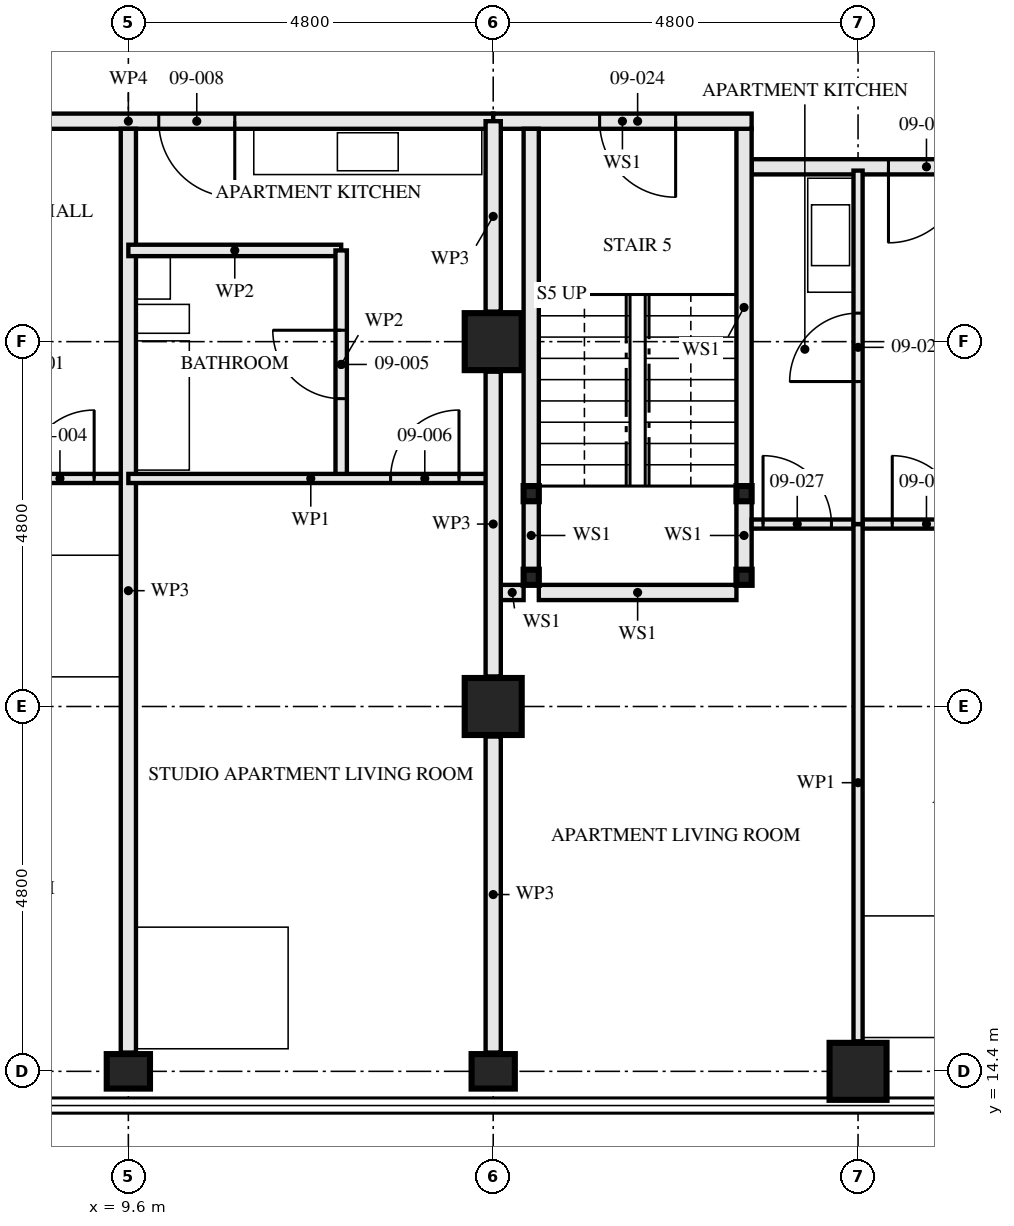
"""IFC4 building model, lengths in metres.
Left out: names, types, materials, properties, quantities, classifications, styles, units other than length and angle.
Written with IfcOpenShell. Run it as: python <this file> out.ifc"""

import sys

from ifc_helpers import new_model, si_unit, direction, frame, frame_2d, origin, origin_2d, place, context, subcontext, project, spatial, rectangle, hollow_rectangle, i_section, extrude, element, fill, save


model = new_model("IFC4")
c1 = context("Model", 3, precision=1e-05, world=origin(), true_north=direction((0.0, 1.0)))
c2 = subcontext(c1, "Body", "Model", "MODEL_VIEW")
j1 = project(units=[si_unit("LENGTHUNIT", "METRE"), si_unit("PLANEANGLEUNIT", "RADIAN")], contexts=[c1])
p1 = place(None, origin())
s1 = spatial("IfcSite", under=j1, at=p1, CompositionType="ELEMENT")
p2 = place(p1, origin())
s2 = spatial("IfcBuilding", under=s1, at=p2, CompositionType="ELEMENT")
p3 = place(p2, frame((0.0, 0.0, 37.5)))
s3 = spatial("IfcBuildingStorey", under=s2, at=p3, CompositionType="ELEMENT", Elevation=37.5)
for number, where, z_axis, x_axis in (
    (1, (9.6, 14.4, 0.0), (0.0, 0.0, 1.0), (0.0, 1.0, 0.0)),
    (2, (14.4, 14.4, 0.0), (0.0, 0.0, 1.0), (0.0, 1.0, 0.0)),
):
    element("IfcColumn", number, at=place(p3, frame(where, z_axis=z_axis, x_axis=x_axis)), inside=s3, PredefinedType="COLUMN", context=c2, shape_type="SweptSolid", body=[
        extrude(i_section(OverallWidth=0.454, OverallDepth=0.569, WebThickness=0.078, FlangeThickness=0.125, FilletRadius=0.015, at=origin_2d()), origin(), (0.0, 0.0, 1.0), 3.5),
    ])
for number, where, z_axis, x_axis in (
    (3, (14.4, 19.2, 0.0), (0.0, 0.0, 1.0), (1.0, 0.0, 0.0)),
    (4, (14.4, 24.0, 0.0), (0.0, 0.0, 1.0), (1.0, 0.0, 0.0)),
    (5, (19.2, 14.4, 0.0), (0.0, 0.0, 1.0), (0.0, 1.0, 0.0)),
):
    element("IfcColumn", number, at=place(p3, frame(where, z_axis=z_axis, x_axis=x_axis)), inside=s3, PredefinedType="COLUMN", context=c2, shape_type="SweptSolid", body=[
        extrude(hollow_rectangle(XDim=0.75, YDim=0.75, WallThickness=0.08, at=origin_2d()), origin(), (0.0, 0.0, 1.0), 3.5),
    ])
for number, where, z_axis, x_axis in (
    (6, (14.9, 20.9, 0.0), (0.0, 0.0, 1.0), (1.0, 0.0, 0.0)),
    (7, (17.7, 20.9, 0.0), (0.0, 0.0, 1.0), (1.0, 0.0, 0.0)),
    (8, (14.9, 22.0, 0.0), (0.0, 0.0, 1.0), (1.0, 0.0, 0.0)),
    (9, (17.7, 22.0, 0.0), (0.0, 0.0, 1.0), (1.0, 0.0, 0.0)),
):
    element("IfcColumn", number, at=place(p3, frame(where, z_axis=z_axis, x_axis=x_axis)), inside=s3, PredefinedType="COLUMN", context=c2, shape_type="SweptSolid", body=[
        extrude(hollow_rectangle(XDim=0.2, YDim=0.2, WallThickness=0.008, at=origin_2d()), origin(), (0.0, 0.0, 1.0), 3.33),
    ])
p4 = place(p3, frame((4.8, 22.2, 0.0), z_axis=(0.0, 0.0, 1.0), x_axis=(1.0, 0.0, 0.0)))
e10 = element("IfcWall", 10, at=p4, inside=s3, PredefinedType="PARTITIONING", context=c2, shape_type="SweptSolid", body=[
    extrude(rectangle(XDim=4.8, YDim=0.12, at=frame_2d((2.4, 0.0))), origin(), (0.0, 0.0, 1.0), 3.33),
])
p5 = place(p4, frame((3.45, 0.0, 0.0)))
e11 = element("IfcOpeningElement", 11, at=p5, cuts=e10, PredefinedType="OPENING", context=c2, shape_type="SweptSolid", body=[
    extrude(rectangle(XDim=0.9, YDim=2.1, at=frame_2d((0.45, 1.05))), frame((0.0, 0.071, 0.0), z_axis=(0.0, -1.0, 0.0), x_axis=(1.0, 0.0, 0.0)), (0.0, 0.0, 1.0), 0.141),
])
p6 = place(p3, frame((9.6, 14.647, 0.0), z_axis=(0.0, 0.0, 1.0), x_axis=(0.0, 1.0, 0.0)))
e12 = element("IfcWall", 12, at=p6, inside=s3, PredefinedType="PARTITIONING", context=c2, shape_type="SweptSolid", body=[
    extrude(rectangle(XDim=12.153, YDim=0.2, at=frame_2d((6.077, 0.0))), origin(), (0.0, 0.0, 1.0), 2.55),
])
p7 = place(p3, frame((12.4, 22.2, 0.0), z_axis=(0.0, 0.0, 1.0), x_axis=(0.0, 1.0, 0.0)))
e13 = element("IfcWall", 13, at=p7, inside=s3, PredefinedType="PARTITIONING", context=c2, shape_type="SweptSolid", body=[
    extrude(rectangle(XDim=3.0, YDim=0.15, at=frame_2d((1.5, 0.0))), origin(), (0.0, 0.0, 1.0), 2.55),
])
p8 = place(p7, frame((1.05, 0.0, 0.0)))
e14 = element("IfcOpeningElement", 14, at=p8, cuts=e13, PredefinedType="OPENING", context=c2, shape_type="SweptSolid", body=[
    extrude(rectangle(XDim=0.9, YDim=2.1, at=frame_2d((0.45, 1.05))), frame((0.0, 0.085, 0.0), z_axis=(0.0, -1.0, 0.0), x_axis=(1.0, 0.0, 0.0)), (0.0, 0.0, 1.0), 0.171),
])
p9 = place(p3, frame((9.6, 25.2, 0.0), z_axis=(0.0, 0.0, 1.0), x_axis=(1.0, 0.0, 0.0)))
e15 = element("IfcWall", 15, at=p9, inside=s3, PredefinedType="PARTITIONING", context=c2, shape_type="SweptSolid", body=[
    extrude(rectangle(XDim=2.8, YDim=0.15, at=frame_2d((1.4, 0.0))), origin(), (0.0, 0.0, 1.0), 3.33),
])
p10 = place(p3, frame((9.6, 22.2, 0.0), z_axis=(0.0, 0.0, 1.0), x_axis=(1.0, 0.0, 0.0)))
e16 = element("IfcWall", 16, at=p10, inside=s3, PredefinedType="PARTITIONING", context=c2, shape_type="SweptSolid", body=[
    extrude(rectangle(XDim=4.8, YDim=0.12, at=frame_2d((2.4, 0.0))), origin(), (0.0, 0.0, 1.0), 3.33),
])
p11 = place(p10, frame((3.45, 0.0, 0.0)))
e17 = element("IfcOpeningElement", 17, at=p11, cuts=e16, PredefinedType="OPENING", context=c2, shape_type="SweptSolid", body=[
    extrude(rectangle(XDim=0.9, YDim=2.1, at=frame_2d((0.45, 1.05))), frame((0.0, 0.071, 0.0), z_axis=(0.0, -1.0, 0.0), x_axis=(1.0, 0.0, 0.0)), (0.0, 0.0, 1.0), 0.141),
])
p12 = place(p3, frame((4.8, 26.9, 0.0), z_axis=(0.0, 0.0, 1.0), x_axis=(1.0, 0.0, 0.0)))
e18 = element("IfcWall", 18, at=p12, inside=s3, PredefinedType="PARTITIONING", context=c2, shape_type="SweptSolid", body=[
    extrude(rectangle(XDim=9.6, YDim=0.2, at=frame_2d((4.8, 0.0))), origin(), (0.0, 0.0, 1.0), 3.33),
])
p13 = place(p12, frame((0.4, 0.0, 0.0)))
e19 = element("IfcOpeningElement", 19, at=p13, cuts=e18, PredefinedType="OPENING", context=c2, shape_type="SweptSolid", body=[
    extrude(rectangle(XDim=1.0, YDim=2.1, at=frame_2d((0.5, 1.05))), frame((0.0, 0.111, 0.0), z_axis=(0.0, -1.0, 0.0), x_axis=(1.0, 0.0, 0.0)), (0.0, 0.0, 1.0), 0.221),
])
p14 = place(p12, frame((5.2, 0.0, 0.0)))
e20 = element("IfcOpeningElement", 20, at=p14, cuts=e18, PredefinedType="OPENING", context=c2, shape_type="SweptSolid", body=[
    extrude(rectangle(XDim=1.0, YDim=2.1, at=frame_2d((0.5, 1.05))), frame((0.0, 0.111, 0.0), z_axis=(0.0, -1.0, 0.0), x_axis=(1.0, 0.0, 0.0)), (0.0, 0.0, 1.0), 0.221),
])
p15 = place(p3, frame((14.9, 21.0, 0.0), z_axis=(0.0, 0.0, 1.0), x_axis=(0.0, 1.0, 0.0)))
e21 = element("IfcWall", 21, at=p15, inside=s3, PredefinedType="SOLIDWALL", context=c2, shape_type="SweptSolid", body=[
    extrude(rectangle(XDim=0.9, YDim=0.2, at=frame_2d((0.45, 0.0))), origin(), (0.0, 0.0, 1.0), 2.99),
])
p16 = place(p3, frame((14.9, 22.1, 0.0), z_axis=(0.0, 0.0, 1.0), x_axis=(0.0, 1.0, 0.0)))
e22 = element("IfcWall", 22, at=p16, inside=s3, PredefinedType="SOLIDWALL", context=c2, shape_type="SweptSolid", body=[
    extrude(rectangle(XDim=4.7, YDim=0.2, at=frame_2d((2.35, 0.0))), origin(), (0.0, 0.0, 1.0), 2.99),
])
p17 = place(p3, frame((17.7, 21.0, 0.0), z_axis=(0.0, 0.0, 1.0), x_axis=(0.0, 1.0, 0.0)))
e23 = element("IfcWall", 23, at=p17, inside=s3, PredefinedType="SOLIDWALL", context=c2, shape_type="SweptSolid", body=[
    extrude(rectangle(XDim=0.9, YDim=0.2, at=frame_2d((0.45, 0.0))), origin(), (0.0, 0.0, 1.0), 2.99),
])
p18 = place(p3, frame((17.7, 22.1, 0.0), z_axis=(0.0, 0.0, 1.0), x_axis=(0.0, 1.0, 0.0)))
e24 = element("IfcWall", 24, at=p18, inside=s3, PredefinedType="SOLIDWALL", context=c2, shape_type="SweptSolid", body=[
    extrude(rectangle(XDim=4.7, YDim=0.2, at=frame_2d((2.35, 0.0))), origin(), (0.0, 0.0, 1.0), 2.99),
])
p19 = place(p3, frame((14.5, 20.7, 0.0), z_axis=(0.0, 0.0, 1.0), x_axis=(1.0, 0.0, 0.0)))
e25 = element("IfcWall", 25, at=p19, inside=s3, PredefinedType="SOLIDWALL", context=c2, shape_type="SweptSolid", body=[
    extrude(rectangle(XDim=0.3, YDim=0.2, at=frame_2d((0.15, 0.0))), origin(), (0.0, 0.0, 1.0), 3.33),
])
p20 = place(p3, frame((15.0, 20.7, 0.0), z_axis=(0.0, 0.0, 1.0), x_axis=(1.0, 0.0, 0.0)))
e26 = element("IfcWall", 26, at=p20, inside=s3, PredefinedType="SOLIDWALL", context=c2, shape_type="SweptSolid", body=[
    extrude(rectangle(XDim=2.6, YDim=0.2, at=frame_2d((1.3, 0.0))), origin(), (0.0, 0.0, 1.0), 3.33),
])
p21 = place(p3, frame((14.4, 26.9, 0.0), z_axis=(0.0, 0.0, 1.0), x_axis=(1.0, 0.0, 0.0)))
e27 = element("IfcWall", 27, at=p21, inside=s3, PredefinedType="SOLIDWALL", context=c2, shape_type="SweptSolid", body=[
    extrude(rectangle(XDim=3.4, YDim=0.2, at=frame_2d((1.7, 0.0))), origin(), (0.0, 0.0, 1.0), 3.33),
])
p22 = place(p21, frame((1.4, 0.0, 0.0)))
e28 = element("IfcOpeningElement", 28, at=p22, cuts=e27, PredefinedType="OPENING", context=c2, shape_type="SweptSolid", body=[
    extrude(rectangle(XDim=1.0, YDim=2.1, at=frame_2d((0.5, 1.05))), frame((0.0, 0.111, 0.0), z_axis=(0.0, -1.0, 0.0), x_axis=(1.0, 0.0, 0.0)), (0.0, 0.0, 1.0), 0.221),
])
p23 = place(p3, frame((19.2, 21.6, 0.0), z_axis=(0.0, 0.0, 1.0), x_axis=(0.0, 1.0, 0.0)))
e29 = element("IfcWall", 29, at=p23, inside=s3, PredefinedType="PARTITIONING", context=c2, shape_type="SweptSolid", body=[
    extrude(rectangle(XDim=4.65, YDim=0.12, at=frame_2d((2.325, 0.0))), origin(), (0.0, 0.0, 1.0), 2.55),
])
p24 = place(p23, frame((1.875, 0.0, 0.0)))
e30 = element("IfcOpeningElement", 30, at=p24, cuts=e29, PredefinedType="OPENING", context=c2, shape_type="SweptSolid", body=[
    extrude(rectangle(XDim=0.9, YDim=2.1, at=frame_2d((0.45, 1.05))), frame((0.0, 0.071, 0.0), z_axis=(0.0, -1.0, 0.0), x_axis=(1.0, 0.0, 0.0)), (0.0, 0.0, 1.0), 0.141),
])
p25 = place(p3, frame((17.8, 21.6, 0.0), z_axis=(0.0, 0.0, 1.0), x_axis=(1.0, 0.0, 0.0)))
e31 = element("IfcWall", 31, at=p25, inside=s3, PredefinedType="PARTITIONING", context=c2, shape_type="SweptSolid", body=[
    extrude(rectangle(XDim=1.4, YDim=0.12, at=frame_2d((0.7, 0.0))), origin(), (0.0, 0.0, 1.0), 3.33),
])
p26 = place(p25, frame((0.15, 0.0, 0.0)))
e32 = element("IfcOpeningElement", 32, at=p26, cuts=e31, PredefinedType="OPENING", context=c2, shape_type="SweptSolid", body=[
    extrude(rectangle(XDim=0.9, YDim=2.1, at=frame_2d((0.45, 1.05))), frame((0.0, 0.071, 0.0), z_axis=(0.0, -1.0, 0.0), x_axis=(1.0, 0.0, 0.0)), (0.0, 0.0, 1.0), 0.141),
])
p27 = place(p3, frame((19.2, 21.6, 0.0), z_axis=(0.0, 0.0, 1.0), x_axis=(1.0, 0.0, 0.0)))
e33 = element("IfcWall", 33, at=p27, inside=s3, PredefinedType="PARTITIONING", context=c2, shape_type="SweptSolid", body=[
    extrude(rectangle(XDim=4.8, YDim=0.12, at=frame_2d((2.4, 0.0))), origin(), (0.0, 0.0, 1.0), 3.33),
])
p28 = place(p27, frame((0.45, 0.0, 0.0)))
e34 = element("IfcOpeningElement", 34, at=p28, cuts=e33, PredefinedType="OPENING", context=c2, shape_type="SweptSolid", body=[
    extrude(rectangle(XDim=0.9, YDim=2.1, at=frame_2d((0.45, 1.05))), frame((0.0, 0.071, 0.0), z_axis=(0.0, -1.0, 0.0), x_axis=(1.0, 0.0, 0.0)), (0.0, 0.0, 1.0), 0.141),
])
p29 = place(p3, frame((19.2, 14.795, 0.0), z_axis=(0.0, 0.0, 1.0), x_axis=(0.0, 1.0, 0.0)))
e35 = element("IfcWall", 35, at=p29, inside=s3, PredefinedType="PARTITIONING", context=c2, shape_type="SweptSolid", body=[
    extrude(rectangle(XDim=6.805, YDim=0.12, at=frame_2d((3.403, 0.0))), origin(), (0.0, 0.0, 1.0), 2.55),
])
p30 = place(p3, frame((17.8, 26.3, 0.0), z_axis=(0.0, 0.0, 1.0), x_axis=(1.0, 0.0, 0.0)))
e36 = element("IfcWall", 36, at=p30, inside=s3, PredefinedType="PARTITIONING", context=c2, shape_type="SweptSolid", body=[
    extrude(rectangle(XDim=11.0, YDim=0.2, at=frame_2d((5.5, 0.0))), origin(), (0.0, 0.0, 1.0), 2.55),
])
p31 = place(p30, frame((1.8, 0.0, 0.0)))
e37 = element("IfcOpeningElement", 37, at=p31, cuts=e36, PredefinedType="OPENING", context=c2, shape_type="SweptSolid", body=[
    extrude(rectangle(XDim=1.0, YDim=2.1, at=frame_2d((0.5, 1.05))), frame((0.0, 0.111, 0.0), z_axis=(0.0, -1.0, 0.0), x_axis=(1.0, 0.0, 0.0)), (0.0, 0.0, 1.0), 0.221),
])
p32 = place(p30, frame((6.6, 0.0, 0.0)))
e38 = element("IfcOpeningElement", 38, at=p32, cuts=e36, PredefinedType="OPENING", context=c2, shape_type="SweptSolid", body=[
    extrude(rectangle(XDim=1.0, YDim=2.1, at=frame_2d((0.5, 1.05))), frame((0.0, 0.111, 0.0), z_axis=(0.0, -1.0, 0.0), x_axis=(1.0, 0.0, 0.0)), (0.0, 0.0, 1.0), 0.221),
])
p33 = place(p3, frame((14.4, 14.647, 0.0), z_axis=(0.0, 0.0, 1.0), x_axis=(0.0, 1.0, 0.0)))
e39 = element("IfcWall", 39, at=p33, inside=s3, PredefinedType="PARTITIONING", context=c2, shape_type="SweptSolid", body=[
    extrude(rectangle(XDim=4.158, YDim=0.2, at=frame_2d((2.079, 0.0))), origin(), (0.0, 0.0, 1.0), 2.32),
])
p34 = place(p3, frame((14.4, 19.595, 0.0), z_axis=(0.0, 0.0, 1.0), x_axis=(0.0, 1.0, 0.0)))
e40 = element("IfcWall", 40, at=p34, inside=s3, PredefinedType="PARTITIONING", context=c2, shape_type="SweptSolid", body=[
    extrude(rectangle(XDim=4.01, YDim=0.2, at=frame_2d((2.005, 0.0))), origin(), (0.0, 0.0, 1.0), 2.32),
])
p35 = place(p3, frame((14.4, 24.395, 0.0), z_axis=(0.0, 0.0, 1.0), x_axis=(0.0, 1.0, 0.0)))
e41 = element("IfcWall", 41, at=p35, inside=s3, PredefinedType="PARTITIONING", context=c2, shape_type="SweptSolid", body=[
    extrude(rectangle(XDim=2.505, YDim=0.2, at=frame_2d((1.252, 0.0))), origin(), (0.0, 0.0, 1.0), 2.32),
])
p36 = place(p5, origin())
e42 = element("IfcDoor", 42, at=p36, inside=s3, OperationType="SINGLE_SWING_LEFT", PredefinedType="DOOR", context=c2, shape_type="SweptSolid", body=[
    extrude(rectangle(XDim=0.9, YDim=2.1, at=frame_2d((0.45, 1.05))), frame((0.0, 0.022, 0.0), z_axis=(0.0, -1.0, 0.0), x_axis=(1.0, 0.0, 0.0)), (0.0, 0.0, 1.0), 0.044),
])
fill(e11, e42)
p37 = place(p8, origin())
e43 = element("IfcDoor", 43, at=p37, inside=s3, OperationType="SINGLE_SWING_LEFT", PredefinedType="DOOR", context=c2, shape_type="SweptSolid", body=[
    extrude(rectangle(XDim=0.9, YDim=2.1, at=frame_2d((0.45, 1.05))), frame((0.0, 0.022, 0.0), z_axis=(0.0, -1.0, 0.0), x_axis=(1.0, 0.0, 0.0)), (0.0, 0.0, 1.0), 0.044),
])
fill(e14, e43)
p38 = place(p11, origin())
e44 = element("IfcDoor", 44, at=p38, inside=s3, OperationType="SINGLE_SWING_LEFT", PredefinedType="DOOR", context=c2, shape_type="SweptSolid", body=[
    extrude(rectangle(XDim=0.9, YDim=2.1, at=frame_2d((0.45, 1.05))), frame((0.0, 0.022, 0.0), z_axis=(0.0, -1.0, 0.0), x_axis=(1.0, 0.0, 0.0)), (0.0, 0.0, 1.0), 0.044),
])
fill(e17, e44)
p39 = place(p14, frame((1.0, 0.0, 0.0), z_axis=(0.0, 0.0, 1.0), x_axis=(-1.0, 0.0, 0.0)))
e45 = element("IfcDoor", 45, at=p39, inside=s3, OperationType="SINGLE_SWING_RIGHT", PredefinedType="DOOR", context=c2, shape_type="SweptSolid", body=[
    extrude(rectangle(XDim=1.0, YDim=2.1, at=frame_2d((0.5, 1.05))), frame((0.0, 0.027, 0.0), z_axis=(0.0, -1.0, 0.0), x_axis=(1.0, 0.0, 0.0)), (0.0, 0.0, 1.0), 0.054),
])
fill(e20, e45)
p40 = place(p22, frame((1.0, 0.0, 0.0), z_axis=(0.0, 0.0, 1.0), x_axis=(-1.0, 0.0, 0.0)))
e46 = element("IfcDoor", 46, at=p40, inside=s3, OperationType="SINGLE_SWING_RIGHT", PredefinedType="DOOR", context=c2, shape_type="SweptSolid", body=[
    extrude(rectangle(XDim=1.0, YDim=2.1, at=frame_2d((0.5, 1.05))), frame((0.0, 0.032, 0.0), z_axis=(0.0, -1.0, 0.0), x_axis=(1.0, 0.0, 0.0)), (0.0, 0.0, 1.0), 0.064),
])
fill(e28, e46)
p41 = place(p24, origin())
e47 = element("IfcDoor", 47, at=p41, inside=s3, OperationType="SINGLE_SWING_RIGHT", PredefinedType="DOOR", context=c2, shape_type="SweptSolid", body=[
    extrude(rectangle(XDim=0.9, YDim=2.1, at=frame_2d((0.45, 1.05))), frame((0.0, 0.022, 0.0), z_axis=(0.0, -1.0, 0.0), x_axis=(1.0, 0.0, 0.0)), (0.0, 0.0, 1.0), 0.044),
])
fill(e30, e47)
p42 = place(p26, origin())
e48 = element("IfcDoor", 48, at=p42, inside=s3, OperationType="SINGLE_SWING_RIGHT", PredefinedType="DOOR", context=c2, shape_type="SweptSolid", body=[
    extrude(rectangle(XDim=0.9, YDim=2.1, at=frame_2d((0.45, 1.05))), frame((0.0, 0.022, 0.0), z_axis=(0.0, -1.0, 0.0), x_axis=(1.0, 0.0, 0.0)), (0.0, 0.0, 1.0), 0.044),
])
fill(e32, e48)
p43 = place(p28, origin())
e49 = element("IfcDoor", 49, at=p43, inside=s3, OperationType="SINGLE_SWING_RIGHT", PredefinedType="DOOR", context=c2, shape_type="SweptSolid", body=[
    extrude(rectangle(XDim=0.9, YDim=2.1, at=frame_2d((0.45, 1.05))), frame((0.0, 0.022, 0.0), z_axis=(0.0, -1.0, 0.0), x_axis=(1.0, 0.0, 0.0)), (0.0, 0.0, 1.0), 0.044),
])
fill(e34, e49)
p44 = place(p31, frame((1.0, 0.0, 0.0), z_axis=(0.0, 0.0, 1.0), x_axis=(-1.0, 0.0, 0.0)))
e50 = element("IfcDoor", 50, at=p44, inside=s3, OperationType="SINGLE_SWING_LEFT", PredefinedType="DOOR", context=c2, shape_type="SweptSolid", body=[
    extrude(rectangle(XDim=1.0, YDim=2.1, at=frame_2d((0.5, 1.05))), frame((0.0, 0.027, 0.0), z_axis=(0.0, -1.0, 0.0), x_axis=(1.0, 0.0, 0.0)), (0.0, 0.0, 1.0), 0.054),
])
fill(e37, e50)
save(model, sys.argv[1])
